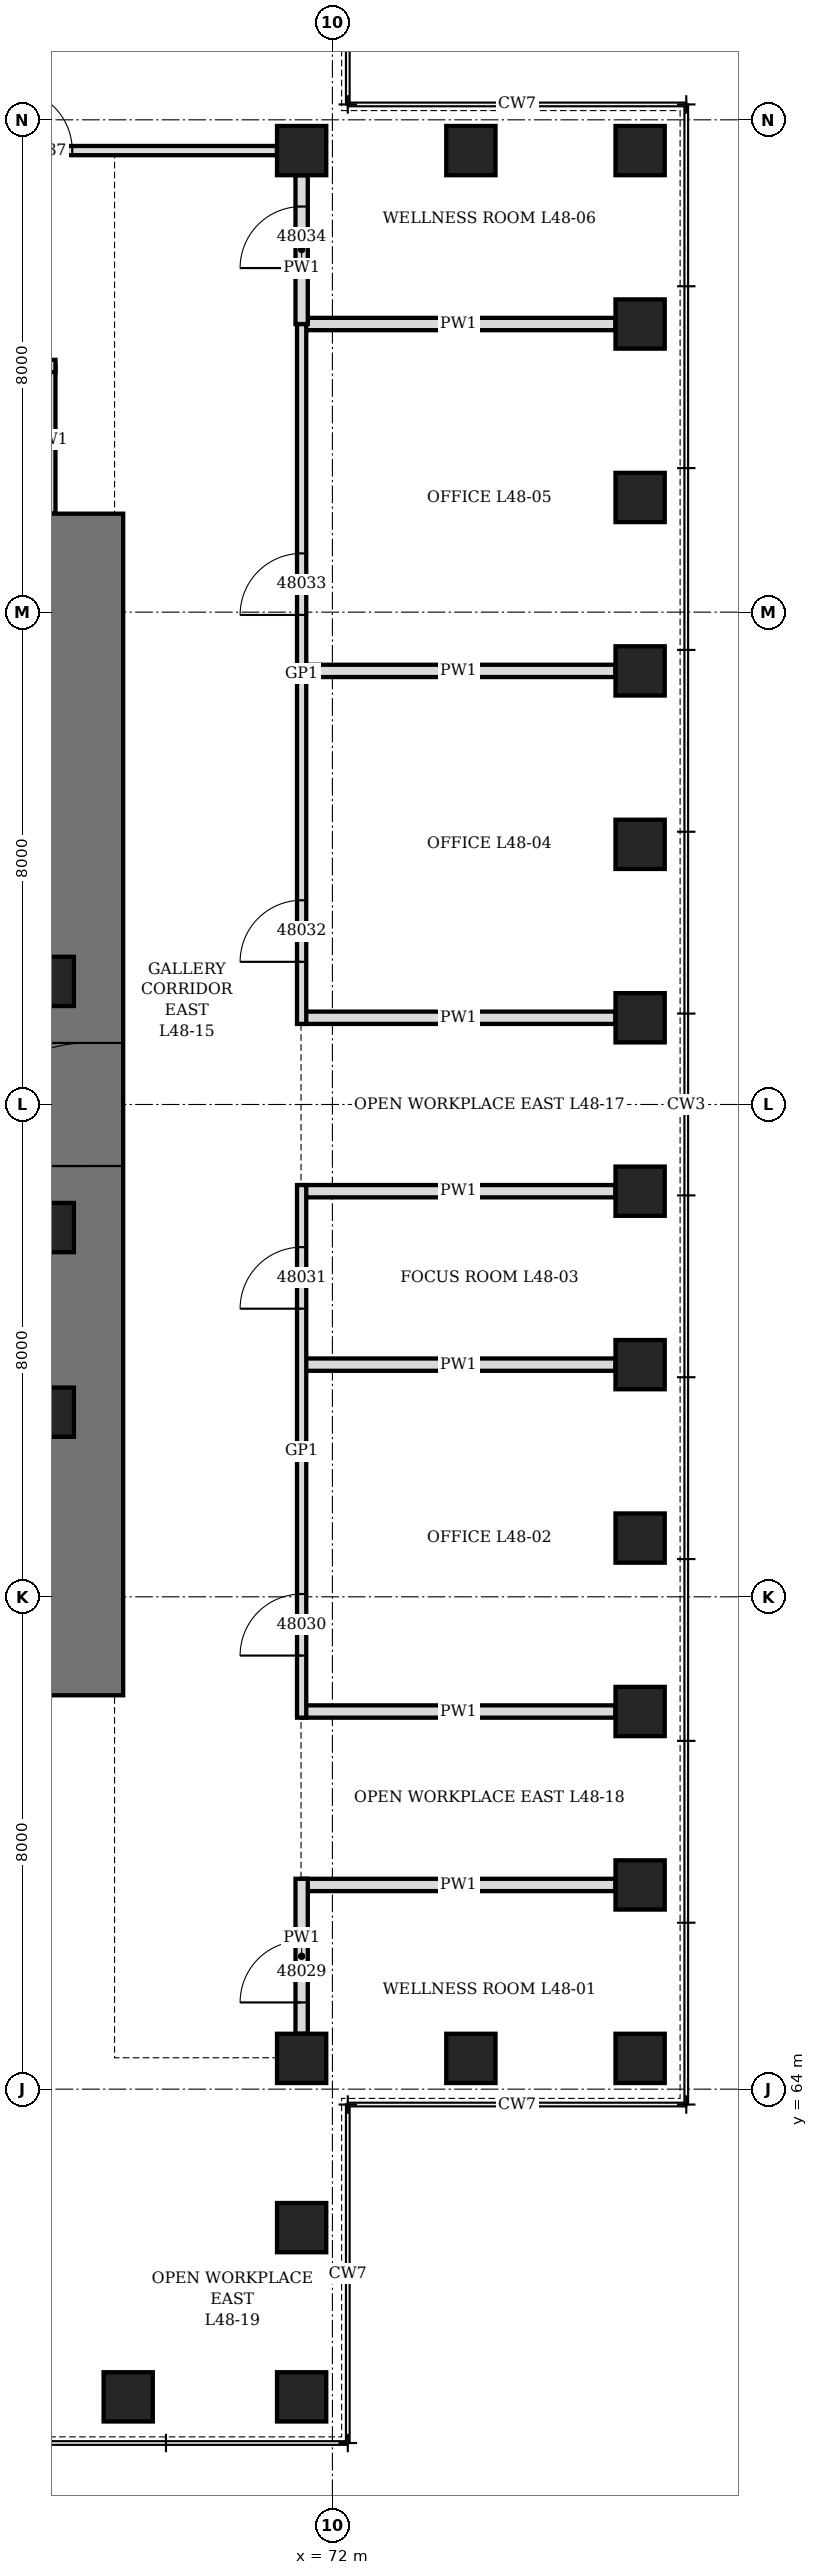
"""IFC4 building model, lengths in metres.
Left out: names, types, materials, properties, quantities, classifications, styles, units other than length and angle.
Written with IfcOpenShell. Run it as: python <this file> out.ifc"""

import sys

from ifc_helpers import new_model, si_unit, direction, frame, frame_2d, origin, origin_2d, place, context, subcontext, project, spatial, rectangle, hollow_rectangle, extrude, element, fill, save


model = new_model("IFC4")
c1 = context("Model", 3, precision=1e-05, world=origin(), true_north=direction((0.0, 1.0)))
c2 = subcontext(c1, "Body", "Model", "MODEL_VIEW")
j1 = project(units=[si_unit("LENGTHUNIT", "METRE"), si_unit("PLANEANGLEUNIT", "RADIAN")], contexts=[c1])
p1 = place(None, origin())
s1 = spatial("IfcSite", under=j1, at=p1, CompositionType="ELEMENT")
p2 = place(p1, origin())
s2 = spatial("IfcBuilding", under=s1, at=p2, CompositionType="ELEMENT")
p3 = place(p2, frame((0.0, 0.0, 214.9)))
s3 = spatial("IfcBuildingStorey", under=s2, at=p3, CompositionType="ELEMENT", Elevation=214.9)
for number, where, z_axis, x_axis in (
    (1, (68.682, 59.0, 0.0), (0.0, 0.0, 1.0), (1.0, 0.0, 0.0)),
    (2, (71.5, 59.0, 0.0), (0.0, 0.0, 1.0), (0.0, 1.0, 0.0)),
    (3, (71.5, 61.75, 0.0), (0.0, 0.0, 1.0), (0.0, 1.0, 0.0)),
    (4, (71.5, 64.5, 0.0), (0.0, 0.0, 1.0), (1.0, 0.0, 0.0)),
    (5, (74.25, 64.5, 0.0), (0.0, 0.0, 1.0), (1.0, 0.0, 0.0)),
    (6, (77.0, 64.5, 0.0), (0.0, 0.0, 1.0), (0.0, 1.0, 0.0)),
    (7, (77.0, 67.318, 0.0), (0.0, 0.0, 1.0), (0.0, 1.0, 0.0)),
    (8, (77.0, 70.136, 0.0), (0.0, 0.0, 1.0), (0.0, 1.0, 0.0)),
    (9, (77.0, 72.955, 0.0), (0.0, 0.0, 1.0), (0.0, 1.0, 0.0)),
    (10, (77.0, 75.773, 0.0), (0.0, 0.0, 1.0), (0.0, 1.0, 0.0)),
    (11, (77.0, 78.591, 0.0), (0.0, 0.0, 1.0), (0.0, 1.0, 0.0)),
    (12, (77.0, 81.409, 0.0), (0.0, 0.0, 1.0), (0.0, 1.0, 0.0)),
    (13, (77.0, 84.227, 0.0), (0.0, 0.0, 1.0), (0.0, 1.0, 0.0)),
    (14, (77.0, 87.045, 0.0), (0.0, 0.0, 1.0), (0.0, 1.0, 0.0)),
    (15, (77.0, 89.864, 0.0), (0.0, 0.0, 1.0), (0.0, 1.0, 0.0)),
    (16, (77.0, 92.682, 0.0), (0.0, 0.0, 1.0), (0.0, 1.0, 0.0)),
    (17, (77.0, 95.5, 0.0), (0.0, 0.0, 1.0), (1.0, 0.0, 0.0)),
    (18, (74.25, 95.5, 0.0), (0.0, 0.0, 1.0), (1.0, 0.0, 0.0)),
    (19, (71.5, 95.5, 0.0), (0.0, 0.0, 1.0), (0.0, 1.0, 0.0)),
):
    element("IfcColumn", number, at=place(p3, frame(where, z_axis=z_axis, x_axis=x_axis)), inside=s3, PredefinedType="COLUMN", context=c2, shape_type="SweptSolid", body=[
        extrude(hollow_rectangle(XDim=0.8, YDim=0.8, WallThickness=0.08, at=origin_2d()), origin(), (0.0, 0.0, 1.0), 4.2),
    ])
p4 = place(p3, frame((68.0, 70.4, 0.0), z_axis=(0.0, 0.0, 1.0), x_axis=(0.0, 1.0, 0.0)))
e20 = element("IfcWall", 20, at=p4, inside=s3, PredefinedType="SHEAR", context=c2, shape_type="SweptSolid", body=[
    extrude(rectangle(XDim=19.2, YDim=1.2, at=frame_2d((9.6, 0.0))), origin(), (0.0, 0.0, 1.0), 4.2),
])
p5 = place(p4, frame((8.6, 0.0, 0.0)))
e21 = element("IfcOpeningElement", 21, at=p5, cuts=e20, PredefinedType="OPENING", context=c2, shape_type="SweptSolid", body=[
    extrude(rectangle(XDim=2.0, YDim=2.4, at=frame_2d((1.0, 1.2))), frame((0.0, 0.61, 0.0), z_axis=(0.0, -1.0, 0.0), x_axis=(1.0, 0.0, 0.0)), (0.0, 0.0, 1.0), 1.22),
])
for number, where, z_axis, x_axis in (
    (22, (67.4, 75.0, 0.0), (0.0, 0.0, 1.0), (1.0, 0.0, 0.0)),
    (23, (67.4, 78.0, 0.0), (0.0, 0.0, 1.0), (1.0, 0.0, 0.0)),
    (24, (67.4, 82.0, 0.0), (0.0, 0.0, 1.0), (1.0, 0.0, 0.0)),
):
    element("IfcColumn", number, at=place(p3, frame(where, z_axis=z_axis, x_axis=x_axis)), inside=s3, PredefinedType="COLUMN", context=c2, shape_type="SweptSolid", body=[
        extrude(hollow_rectangle(XDim=0.8, YDim=0.8, WallThickness=0.1, at=origin_2d()), origin(), (0.0, 0.0, 1.0), 4.2),
    ])
for number, where, z_axis, x_axis in (
    (25, (71.5, 67.318, 0.0), (0.0, 0.0, 1.0), (1.0, 0.0, 0.0)),
    (26, (71.5, 70.136, 0.0), (0.0, 0.0, 1.0), (1.0, 0.0, 0.0)),
    (27, (71.5, 75.773, 0.0), (0.0, 0.0, 1.0), (1.0, 0.0, 0.0)),
    (28, (71.5, 78.591, 0.0), (0.0, 0.0, 1.0), (1.0, 0.0, 0.0)),
    (29, (71.5, 81.409, 0.0), (0.0, 0.0, 1.0), (1.0, 0.0, 0.0)),
    (30, (71.5, 87.045, 0.0), (0.0, 0.0, 1.0), (1.0, 0.0, 0.0)),
    (31, (71.5, 92.682, 0.0), (0.0, 0.0, 1.0), (1.0, 0.0, 0.0)),
):
    element("IfcWall", number, at=place(p3, frame(where, z_axis=z_axis, x_axis=x_axis)), inside=s3, PredefinedType="PARTITIONING", context=c2, shape_type="SweptSolid", body=[
        extrude(rectangle(XDim=5.1, YDim=0.2, at=frame_2d((2.55, 0.0))), origin(), (0.0, 0.0, 1.0), 3.428),
    ])
p6 = place(p3, frame((67.4, 89.6, 0.0), z_axis=(0.0, 0.0, 1.0), x_axis=(0.0, 1.0, 0.0)))
e32 = element("IfcWall", 32, at=p6, inside=s3, PredefinedType="PARTITIONING", context=c2, shape_type="SweptSolid", body=[
    extrude(rectangle(XDim=2.4, YDim=0.2, at=frame_2d((1.2, 0.0))), origin(), (0.0, 0.0, 1.0), 4.04),
])
p7 = place(p3, frame((60.5, 92.0, 0.0), z_axis=(0.0, 0.0, 1.0), x_axis=(1.0, 0.0, 0.0)))
e33 = element("IfcWall", 33, at=p7, inside=s3, PredefinedType="PARTITIONING", context=c2, shape_type="SweptSolid", body=[
    extrude(rectangle(XDim=7.0, YDim=0.2, at=frame_2d((3.5, 0.0))), origin(), (0.0, 0.0, 1.0), 4.04),
])
p8 = place(p7, frame((3.0, 0.0, 0.0)))
e34 = element("IfcOpeningElement", 34, at=p8, cuts=e33, PredefinedType="OPENING", context=c2, shape_type="SweptSolid", body=[
    extrude(rectangle(XDim=1.0, YDim=2.1, at=frame_2d((0.5, 1.05))), frame((0.0, 0.11, 0.0), z_axis=(0.0, -1.0, 0.0), x_axis=(1.0, 0.0, 0.0)), (0.0, 0.0, 1.0), 0.22),
])
p9 = place(p3, frame((62.946, 95.5, 0.0), z_axis=(0.0, 0.0, 1.0), x_axis=(1.0, 0.0, 0.0)))
e35 = element("IfcWall", 35, at=p9, inside=s3, PredefinedType="PARTITIONING", context=c2, shape_type="SweptSolid", body=[
    extrude(rectangle(XDim=8.155, YDim=0.15, at=frame_2d((4.077, 0.0))), origin(), (0.0, 0.0, 1.0), 4.04),
])
p10 = place(p9, frame((3.827, 0.0, 0.0)))
e36 = element("IfcOpeningElement", 36, at=p10, cuts=e35, PredefinedType="OPENING", context=c2, shape_type="SweptSolid", body=[
    extrude(rectangle(XDim=1.0, YDim=2.4, at=frame_2d((0.5, 1.2))), frame((0.0, 0.085, 0.0), z_axis=(0.0, -1.0, 0.0), x_axis=(1.0, 0.0, 0.0)), (0.0, 0.0, 1.0), 0.17),
])
p11 = place(p3, frame((71.5, 70.036, 0.0), z_axis=(0.0, 0.0, 1.0), x_axis=(0.0, 1.0, 0.0)))
e37 = element("IfcWall", 37, at=p11, inside=s3, PredefinedType="PARTITIONING", context=c2, shape_type="SweptSolid", body=[
    extrude(rectangle(XDim=8.655, YDim=0.15, at=frame_2d((4.327, 0.0))), origin(), (0.0, 0.0, 1.0), 4.04),
])
p12 = place(p11, frame((1.009, 0.0, 0.0)))
e38 = element("IfcOpeningElement", 38, at=p12, cuts=e37, PredefinedType="OPENING", context=c2, shape_type="SweptSolid", body=[
    extrude(rectangle(XDim=1.0, YDim=2.1, at=frame_2d((0.5, 1.05))), frame((0.0, 0.085, 0.0), z_axis=(0.0, -1.0, 0.0), x_axis=(1.0, 0.0, 0.0)), (0.0, 0.0, 1.0), 0.17),
])
p13 = place(p11, frame((6.646, 0.0, 0.0)))
e39 = element("IfcOpeningElement", 39, at=p13, cuts=e37, PredefinedType="OPENING", context=c2, shape_type="SweptSolid", body=[
    extrude(rectangle(XDim=1.0, YDim=2.4, at=frame_2d((0.5, 1.2))), frame((0.0, 0.085, 0.0), z_axis=(0.0, -1.0, 0.0), x_axis=(1.0, 0.0, 0.0)), (0.0, 0.0, 1.0), 0.17),
])
p14 = place(p3, frame((71.5, 81.309, 0.0), z_axis=(0.0, 0.0, 1.0), x_axis=(0.0, 1.0, 0.0)))
e40 = element("IfcWall", 40, at=p14, inside=s3, PredefinedType="PARTITIONING", context=c2, shape_type="SweptSolid", body=[
    extrude(rectangle(XDim=11.373, YDim=0.15, at=frame_2d((5.687, 0.0))), origin(), (0.0, 0.0, 1.0), 4.04),
])
p15 = place(p14, frame((1.009, 0.0, 0.0)))
e41 = element("IfcOpeningElement", 41, at=p15, cuts=e40, PredefinedType="OPENING", context=c2, shape_type="SweptSolid", body=[
    extrude(rectangle(XDim=1.0, YDim=2.1, at=frame_2d((0.5, 1.05))), frame((0.0, 0.085, 0.0), z_axis=(0.0, -1.0, 0.0), x_axis=(1.0, 0.0, 0.0)), (0.0, 0.0, 1.0), 0.17),
])
p16 = place(p14, frame((6.646, 0.0, 0.0)))
e42 = element("IfcOpeningElement", 42, at=p16, cuts=e40, PredefinedType="OPENING", context=c2, shape_type="SweptSolid", body=[
    extrude(rectangle(XDim=1.0, YDim=2.1, at=frame_2d((0.5, 1.05))), frame((0.0, 0.085, 0.0), z_axis=(0.0, -1.0, 0.0), x_axis=(1.0, 0.0, 0.0)), (0.0, 0.0, 1.0), 0.17),
])
p17 = place(p3, frame((71.5, 64.9, 0.0), z_axis=(0.0, 0.0, 1.0), x_axis=(0.0, 1.0, 0.0)))
e43 = element("IfcWall", 43, at=p17, inside=s3, PredefinedType="PARTITIONING", context=c2, shape_type="SweptSolid", body=[
    extrude(rectangle(XDim=2.518, YDim=0.2, at=frame_2d((1.259, 0.0))), origin(), (0.0, 0.0, 1.0), 4.04),
])
p18 = place(p17, frame((0.509, 0.0, 0.0)))
e44 = element("IfcOpeningElement", 44, at=p18, cuts=e43, PredefinedType="OPENING", context=c2, shape_type="SweptSolid", body=[
    extrude(rectangle(XDim=1.0, YDim=2.1, at=frame_2d((0.5, 1.05))), frame((0.0, 0.11, 0.0), z_axis=(0.0, -1.0, 0.0), x_axis=(1.0, 0.0, 0.0)), (0.0, 0.0, 1.0), 0.22),
])
p19 = place(p3, frame((71.5, 92.682, 0.0), z_axis=(0.0, 0.0, 1.0), x_axis=(0.0, 1.0, 0.0)))
e45 = element("IfcWall", 45, at=p19, inside=s3, PredefinedType="PARTITIONING", context=c2, shape_type="SweptSolid", body=[
    extrude(rectangle(XDim=2.418, YDim=0.2, at=frame_2d((1.209, 0.0))), origin(), (0.0, 0.0, 1.0), 4.04),
])
p20 = place(p19, frame((0.909, 0.0, 0.0)))
e46 = element("IfcOpeningElement", 46, at=p20, cuts=e45, PredefinedType="OPENING", context=c2, shape_type="SweptSolid", body=[
    extrude(rectangle(XDim=1.0, YDim=2.1, at=frame_2d((0.5, 1.05))), frame((0.0, 0.11, 0.0), z_axis=(0.0, -1.0, 0.0), x_axis=(1.0, 0.0, 0.0)), (0.0, 0.0, 1.0), 0.22),
])
p21 = place(p5, origin())
e47 = element("IfcDoor", 47, at=p21, inside=s3, OperationType="DOUBLE_DOOR_SINGLE_SWING", PredefinedType="DOOR", context=c2, shape_type="SweptSolid", body=[
    extrude(rectangle(XDim=2.0, YDim=2.4, at=frame_2d((1.0, 1.2))), frame((0.0, 0.35, 0.0), z_axis=(0.0, -1.0, 0.0), x_axis=(1.0, 0.0, 0.0)), (0.0, 0.0, 1.0), 0.7),
])
fill(e21, e47)
p22 = place(p18, origin())
e48 = element("IfcDoor", 48, at=p22, inside=s3, OperationType="SINGLE_SWING_LEFT", PredefinedType="DOOR", context=c2, shape_type="SweptSolid", body=[
    extrude(rectangle(XDim=1.0, YDim=2.1, at=frame_2d((0.5, 1.05))), frame((0.0, 0.1, 0.0), z_axis=(0.0, -1.0, 0.0), x_axis=(1.0, 0.0, 0.0)), (0.0, 0.0, 1.0), 0.199),
])
fill(e44, e48)
p23 = place(p12, origin())
e49 = element("IfcDoor", 49, at=p23, inside=s3, OperationType="SINGLE_SWING_LEFT", PredefinedType="DOOR", context=c2, shape_type="SweptSolid", body=[
    extrude(rectangle(XDim=1.0, YDim=2.1, at=frame_2d((0.5, 1.05))), frame((0.0, 0.075, 0.0), z_axis=(0.0, -1.0, 0.0), x_axis=(1.0, 0.0, 0.0)), (0.0, 0.0, 1.0), 0.149),
])
fill(e38, e49)
p24 = place(p13, origin())
e50 = element("IfcDoor", 50, at=p24, inside=s3, OperationType="SINGLE_SWING_RIGHT", PredefinedType="DOOR", context=c2, shape_type="SweptSolid", body=[
    extrude(rectangle(XDim=1.0, YDim=2.4, at=frame_2d((0.5, 1.2))), frame((0.0, 0.075, 0.0), z_axis=(0.0, -1.0, 0.0), x_axis=(1.0, 0.0, 0.0)), (0.0, 0.0, 1.0), 0.149),
])
fill(e39, e50)
p25 = place(p15, origin())
e51 = element("IfcDoor", 51, at=p25, inside=s3, OperationType="SINGLE_SWING_LEFT", PredefinedType="DOOR", context=c2, shape_type="SweptSolid", body=[
    extrude(rectangle(XDim=1.0, YDim=2.1, at=frame_2d((0.5, 1.05))), frame((0.0, 0.075, 0.0), z_axis=(0.0, -1.0, 0.0), x_axis=(1.0, 0.0, 0.0)), (0.0, 0.0, 1.0), 0.149),
])
fill(e41, e51)
p26 = place(p16, origin())
e52 = element("IfcDoor", 52, at=p26, inside=s3, OperationType="SINGLE_SWING_LEFT", PredefinedType="DOOR", context=c2, shape_type="SweptSolid", body=[
    extrude(rectangle(XDim=1.0, YDim=2.1, at=frame_2d((0.5, 1.05))), frame((0.0, 0.075, 0.0), z_axis=(0.0, -1.0, 0.0), x_axis=(1.0, 0.0, 0.0)), (0.0, 0.0, 1.0), 0.149),
])
fill(e42, e52)
p27 = place(p20, origin())
e53 = element("IfcDoor", 53, at=p27, inside=s3, OperationType="SINGLE_SWING_LEFT", PredefinedType="DOOR", context=c2, shape_type="SweptSolid", body=[
    extrude(rectangle(XDim=1.0, YDim=2.1, at=frame_2d((0.5, 1.05))), frame((0.0, 0.1, 0.0), z_axis=(0.0, -1.0, 0.0), x_axis=(1.0, 0.0, 0.0)), (0.0, 0.0, 1.0), 0.199),
])
fill(e46, e53)
p28 = place(p10, origin())
e54 = element("IfcDoor", 54, at=p28, inside=s3, OperationType="SINGLE_SWING_RIGHT", PredefinedType="DOOR", context=c2, shape_type="SweptSolid", body=[
    extrude(rectangle(XDim=1.0, YDim=2.4, at=frame_2d((0.5, 1.2))), frame((0.0, 0.075, 0.0), z_axis=(0.0, -1.0, 0.0), x_axis=(1.0, 0.0, 0.0)), (0.0, 0.0, 1.0), 0.149),
])
fill(e36, e54)
save(model, sys.argv[1])
